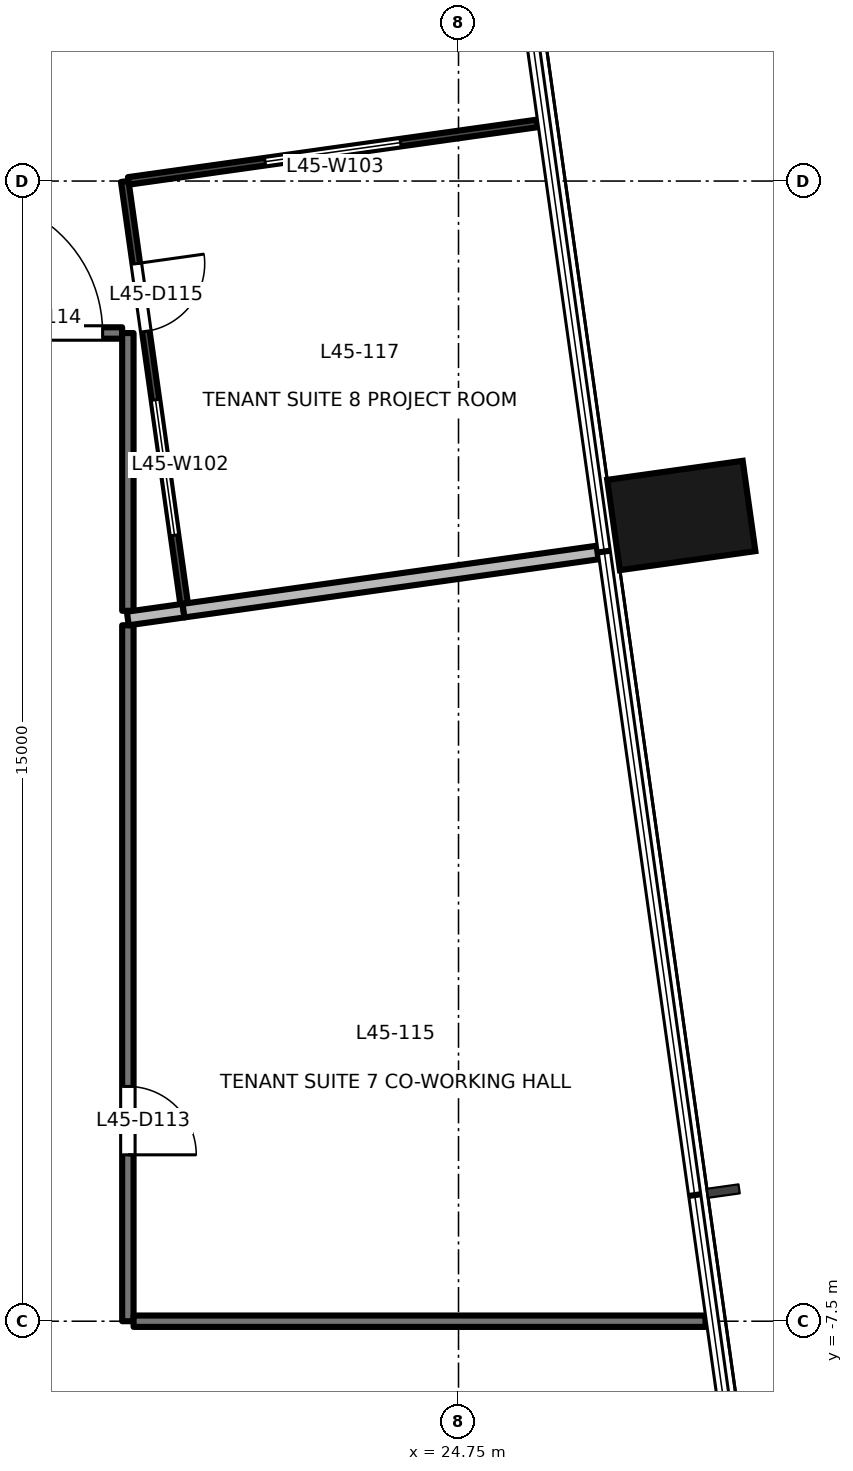
"""IFC4 building model, lengths in metres.
Left out: names, types, materials, properties, quantities, classifications, styles, units other than length and angle.
Written with IfcOpenShell. Run it as: python <this file> out.ifc"""

import sys

from ifc_helpers import new_model, si_unit, direction, frame, frame_2d, origin, origin_2d, place, context, subcontext, project, spatial, rectangle, extrude, element, fill, save


model = new_model("IFC4")
c1 = context("Model", 3, precision=1e-05, world=origin(), true_north=direction((0.0, 1.0)))
c2 = subcontext(c1, "Body", "Model", "MODEL_VIEW")
j1 = project(units=[si_unit("LENGTHUNIT", "METRE"), si_unit("PLANEANGLEUNIT", "RADIAN")], contexts=[c1])
p1 = place(None, origin())
s1 = spatial("IfcSite", under=j1, at=p1, CompositionType="ELEMENT")
p2 = place(p1, origin())
s2 = spatial("IfcBuilding", under=s1, at=p2, CompositionType="ELEMENT")
p3 = place(p2, frame((0.0, 0.0, 195.8)))
s3 = spatial("IfcBuildingStorey", under=s2, at=p3, CompositionType="ELEMENT", Elevation=195.8)
p4 = place(p3, frame((27.681, 3.1, -0.2), z_axis=(0.0, 0.0, 1.0), x_axis=(-0.139190384377, 0.990265639562, 0.0)))
e1 = element("IfcColumn", 1, at=p4, inside=s3, PredefinedType="COLUMN", context=c2, shape_type="SweptSolid", body=[
    extrude(rectangle(XDim=1.2, YDim=1.8, at=origin_2d()), origin(), (0.0, 0.0, 1.0), 3.9),
])
p5 = place(p3, frame((20.4, 1.656, 0.0), z_axis=(0.0, 0.0, 1.0), x_axis=(0.0, -1.0, 0.0)))
e2 = element("IfcWall", 2, at=p5, inside=s3, PredefinedType="PARTITIONING", context=c2, shape_type="SweptSolid", body=[
    extrude(rectangle(XDim=9.156, YDim=0.15, at=frame_2d((4.578, 0.0))), origin(), (0.0, 0.0, 1.0), 3.25),
])
p6 = place(p5, frame((6.067, 0.0, 0.0)))
e3 = element("IfcOpeningElement", 3, at=p6, cuts=e2, PredefinedType="OPENING", context=c2, shape_type="SweptSolid", body=[
    extrude(rectangle(XDim=0.9, YDim=2.1, at=frame_2d((0.45, 1.05))), frame((0.0, 0.085, 0.0), z_axis=(0.0, -1.0, 0.0), x_axis=(1.0, 0.0, 0.0)), (0.0, 0.0, 1.0), 0.171),
])
p7 = place(p3, frame((20.475, -7.5, 0.0), z_axis=(0.0, 0.0, 1.0), x_axis=(1.0, 0.0, 0.0)))
e4 = element("IfcWall", 4, at=p7, inside=s3, PredefinedType="PARTITIONING", context=c2, shape_type="SweptSolid", body=[
    extrude(rectangle(XDim=7.524, YDim=0.15, at=frame_2d((3.762, 0.0))), origin(), (0.0, 0.0, 1.0), 3.7),
])
p8 = place(p3, frame((18.0, 5.501, 0.0), z_axis=(0.0, 0.0, 1.0), x_axis=(1.0, 0.0, 0.0)))
e5 = element("IfcWall", 5, at=p8, inside=s3, PredefinedType="PARTITIONING", context=c2, shape_type="SweptSolid", body=[
    extrude(rectangle(XDim=2.325, YDim=0.15, at=frame_2d((1.163, 0.0))), origin(), (0.0, 0.0, 1.0), 3.7),
])
p9 = place(p8, frame((0.268, 0.0, 0.0)))
e6 = element("IfcOpeningElement", 6, at=p9, cuts=e5, PredefinedType="OPENING", context=c2, shape_type="SweptSolid", body=[
    extrude(rectangle(XDim=1.8, YDim=2.1, at=frame_2d((0.9, 1.05))), frame((0.0, 0.085, 0.0), z_axis=(0.0, -1.0, 0.0), x_axis=(1.0, 0.0, 0.0)), (0.0, 0.0, 1.0), 0.171),
])
p10 = place(p3, frame((20.4, 5.5, 0.0), z_axis=(0.0, 0.0, 1.0), x_axis=(0.0, -1.0, 0.0)))
e7 = element("IfcWall", 7, at=p10, inside=s3, PredefinedType="PARTITIONING", context=c2, shape_type="SweptSolid", body=[
    extrude(rectangle(XDim=3.654, YDim=0.15, at=frame_2d((1.827, 0.0))), origin(), (0.0, 0.0, 1.0), 3.25),
])
p11 = place(p3, frame((20.399, 1.745, 0.0), z_axis=(0.0, 0.0, 1.0), x_axis=(0.990315465901, 0.138835434947, 0.0)))
e8 = element("IfcWall", 8, at=p11, inside=s3, PredefinedType="PARTITIONING", context=c2, shape_type="SweptSolid", body=[
    extrude(rectangle(XDim=0.74, YDim=0.18, at=frame_2d((0.37, 0.0))), origin(), (0.0, 0.0, 1.0), 3.7),
])
p12 = place(p3, frame((21.132, 1.848, 0.0), z_axis=(0.0, 0.0, 1.0), x_axis=(0.990277893792, 0.139103174181, 0.0)))
e9 = element("IfcWall", 9, at=p12, inside=s3, PredefinedType="PARTITIONING", context=c2, shape_type="SweptSolid", body=[
    extrude(rectangle(XDim=5.5, YDim=0.18, at=frame_2d((2.75, 0.0))), origin(), (0.0, 0.0, 1.0), 3.7),
])
p13 = place(p3, frame((20.359, 7.495, 0.0), z_axis=(0.0, 0.0, 1.0), x_axis=(0.139221490403, -0.990261266843, 0.0)))
e10 = element("IfcWall", 10, at=p13, inside=s3, PredefinedType="PARTITIONING", context=c2, shape_type="SweptSolid", body=[
    extrude(rectangle(XDim=5.61, YDim=0.1, at=frame_2d((2.805, 0.0))), origin(), (0.0, 0.0, 1.0), 3.25),
])
p14 = place(p13, frame((1.092, 0.0, 0.0)))
e11 = element("IfcOpeningElement", 11, at=p14, cuts=e10, PredefinedType="OPENING", context=c2, shape_type="SweptSolid", body=[
    extrude(rectangle(XDim=0.9, YDim=2.1, at=frame_2d((0.45, 1.05))), frame((0.0, 0.061, 0.0), z_axis=(0.0, -1.0, 0.0), x_axis=(1.0, 0.0, 0.0)), (0.0, 0.0, 1.0), 0.121),
])
p15 = place(p13, frame((2.901, 0.0, 0.9)))
e12 = element("IfcOpeningElement", 12, at=p15, cuts=e10, PredefinedType="OPENING", context=c2, shape_type="SweptSolid", body=[
    extrude(rectangle(XDim=1.8, YDim=1.2, at=frame_2d((0.9, 0.6))), frame((0.0, 0.061, 0.0), z_axis=(0.0, -1.0, 0.0), x_axis=(1.0, 0.0, 0.0)), (0.0, 0.0, 1.0), 0.121),
])
p16 = place(p3, frame((25.785, 8.258, 0.0), z_axis=(0.0, 0.0, 1.0), x_axis=(-0.990257353855, -0.139249320055, 0.0)))
e13 = element("IfcWall", 13, at=p16, inside=s3, PredefinedType="PARTITIONING", context=c2, shape_type="SweptSolid", body=[
    extrude(rectangle(XDim=5.43, YDim=0.1, at=frame_2d((2.715, 0.0))), origin(), (0.0, 0.0, 1.0), 3.7),
])
p17 = place(p16, frame((1.815, 0.0, 0.9)))
e14 = element("IfcOpeningElement", 14, at=p17, cuts=e13, PredefinedType="OPENING", context=c2, shape_type="SweptSolid", body=[
    extrude(rectangle(XDim=1.8, YDim=1.2, at=frame_2d((0.9, 0.6))), frame((0.0, 0.061, 0.0), z_axis=(0.0, -1.0, 0.0), x_axis=(1.0, 0.0, 0.0)), (0.0, 0.0, 1.0), 0.121),
])
p18 = place(p6, origin())
e15 = element("IfcDoor", 15, at=p18, inside=s3, OperationType="SINGLE_SWING_RIGHT", PredefinedType="DOOR", context=c2, shape_type="SweptSolid", body=[
    extrude(rectangle(XDim=0.9, YDim=2.1, at=frame_2d((0.45, 1.05))), frame((0.0, 0.025, 0.0), z_axis=(0.0, -1.0, 0.0), x_axis=(1.0, 0.0, 0.0)), (0.0, 0.0, 1.0), 0.05),
])
fill(e3, e15)
p19 = place(p9, origin())
e16 = element("IfcDoor", 16, at=p19, inside=s3, OperationType="DOUBLE_DOOR_SINGLE_SWING", PredefinedType="DOOR", context=c2, shape_type="SweptSolid", body=[
    extrude(rectangle(XDim=1.8, YDim=2.1, at=frame_2d((0.9, 1.05))), frame((0.0, 0.025, 0.0), z_axis=(0.0, -1.0, 0.0), x_axis=(1.0, 0.0, 0.0)), (0.0, 0.0, 1.0), 0.05),
])
fill(e6, e16)
p20 = place(p14, origin())
e17 = element("IfcDoor", 17, at=p20, inside=s3, OperationType="SINGLE_SWING_LEFT", PredefinedType="DOOR", context=c2, shape_type="SweptSolid", body=[
    extrude(rectangle(XDim=0.9, YDim=2.1, at=frame_2d((0.45, 1.05))), frame((0.0, 0.025, 0.0), z_axis=(0.0, -1.0, 0.0), x_axis=(1.0, 0.0, 0.0)), (0.0, 0.0, 1.0), 0.05),
])
fill(e11, e17)
p21 = place(p15, origin())
e18 = element("IfcWindow", 18, at=p21, inside=s3, PartitioningType="SINGLE_PANEL", PredefinedType="WINDOW", context=c2, shape_type="SweptSolid", body=[
    extrude(rectangle(XDim=1.8, YDim=1.2, at=frame_2d((0.9, 0.6))), frame((0.0, 0.03, 0.0), z_axis=(0.0, -1.0, 0.0), x_axis=(1.0, 0.0, 0.0)), (0.0, 0.0, 1.0), 0.06),
])
fill(e12, e18)
p22 = place(p17, origin())
e19 = element("IfcWindow", 19, at=p22, inside=s3, PartitioningType="SINGLE_PANEL", PredefinedType="WINDOW", context=c2, shape_type="SweptSolid", body=[
    extrude(rectangle(XDim=1.8, YDim=1.2, at=frame_2d((0.9, 0.6))), frame((0.0, 0.03, 0.0), z_axis=(0.0, -1.0, 0.0), x_axis=(1.0, 0.0, 0.0)), (0.0, 0.0, 1.0), 0.06),
])
fill(e14, e19)
save(model, sys.argv[1])
